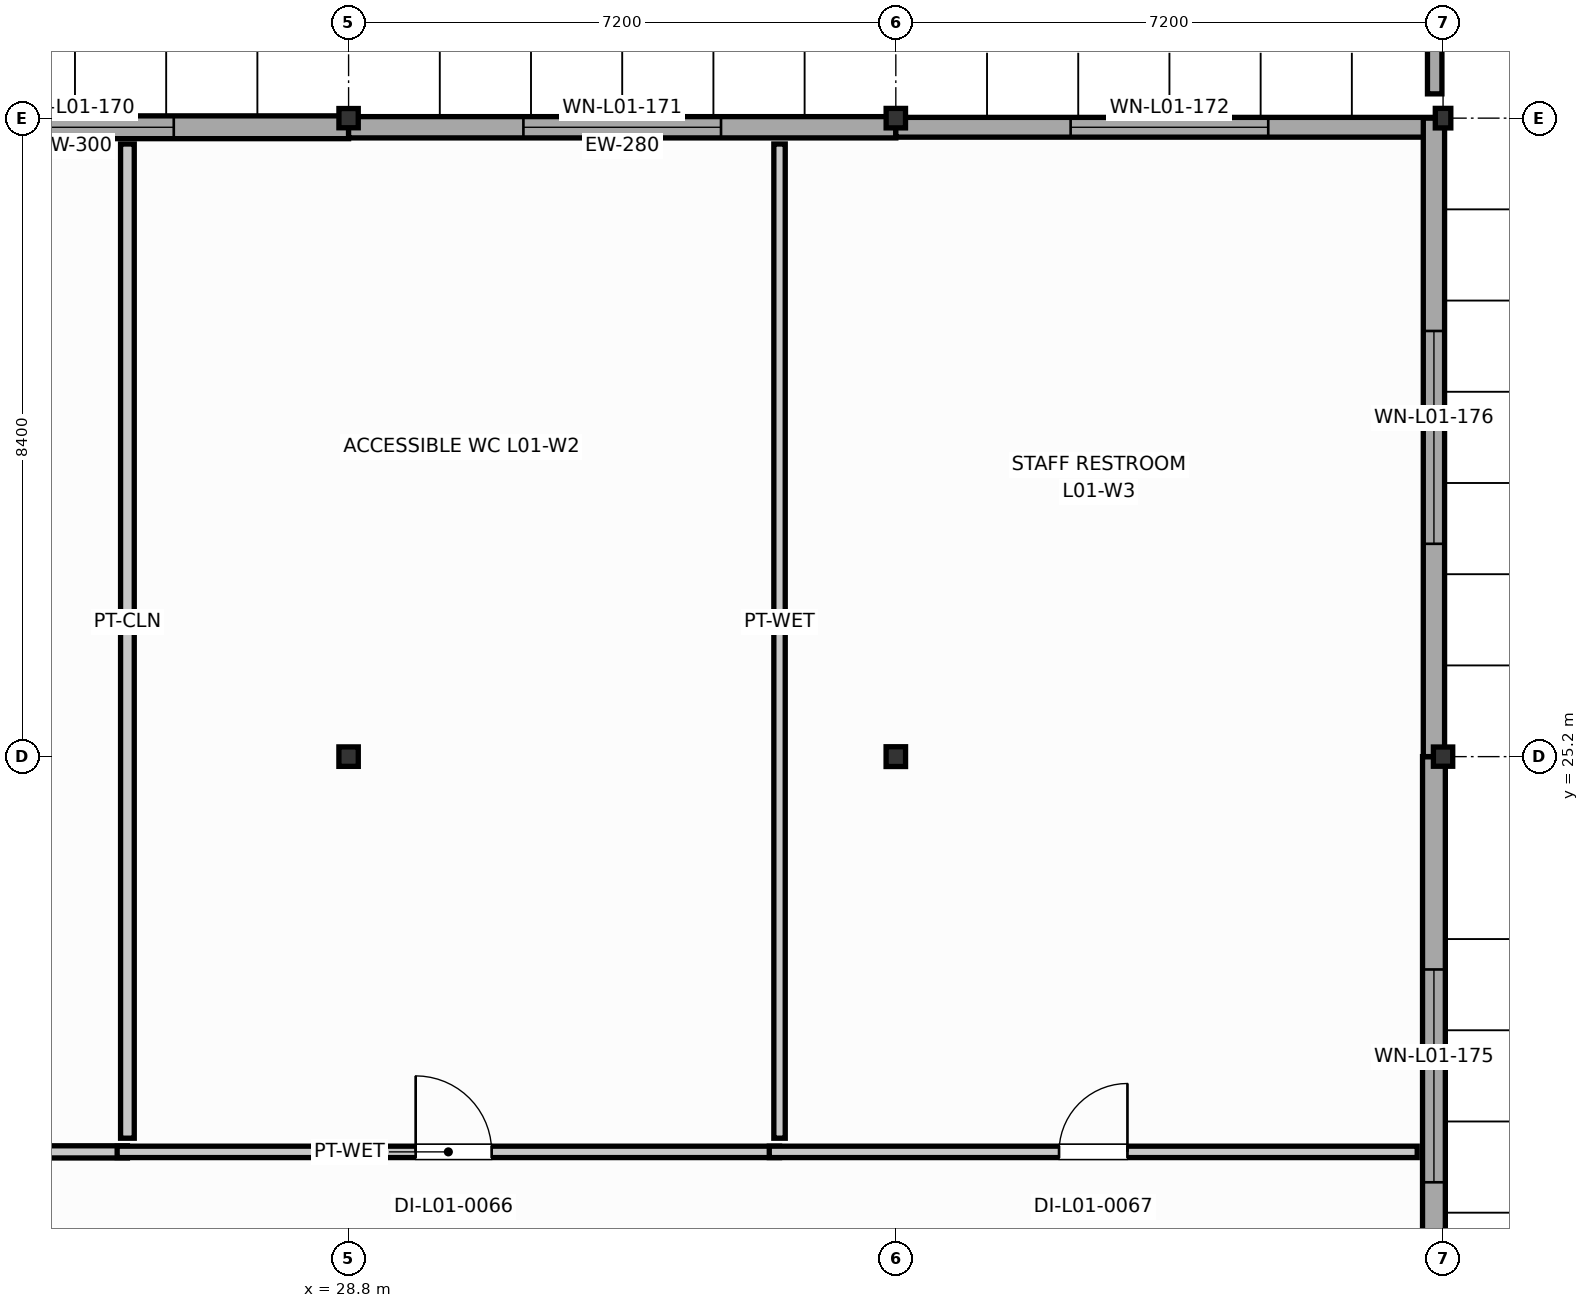
"""IFC4 building model, lengths in metres.
Left out: names, types, materials, properties, quantities, classifications, styles, units other than length and angle.
Written with IfcOpenShell. Run it as: python <this file> out.ifc"""

import sys

from ifc_helpers import new_model, si_unit, direction, frame, frame_2d, origin, origin_2d, place, context, subcontext, project, spatial, rectangle, i_section, extrude, element, fill, save


model = new_model("IFC4")
c1 = context("Model", 3, precision=1e-05, world=origin(), true_north=direction((0.0, 1.0)))
c2 = subcontext(c1, "Body", "Model", "MODEL_VIEW")
j1 = project(units=[si_unit("LENGTHUNIT", "METRE"), si_unit("PLANEANGLEUNIT", "RADIAN")], contexts=[c1])
p1 = place(None, origin())
s1 = spatial("IfcSite", under=j1, at=p1, CompositionType="ELEMENT")
p2 = place(p1, origin())
s2 = spatial("IfcBuilding", under=s1, at=p2, CompositionType="ELEMENT")
p3 = place(p2, frame((0.0, 0.0, 4.8)))
s3 = spatial("IfcBuildingStorey", under=s2, at=p3, CompositionType="ELEMENT", Elevation=4.8)
p4 = place(p3, frame((28.8, 25.2, 0.0), z_axis=(0.0, 0.0, 1.0), x_axis=(1.0, 0.0, 0.0)))
e1 = element("IfcColumn", 1, at=p4, inside=s3, PredefinedType="COLUMN", context=c2, shape_type="SweptSolid", body=[
    extrude(i_section(OverallWidth=0.255, OverallDepth=0.256, WebThickness=0.01, FlangeThickness=0.016, FilletRadius=0.013, at=origin_2d()), origin(), (0.0, 0.0, 1.0), 4.2),
])
p5 = place(p3, frame((28.8, 33.6, 0.0), z_axis=(0.0, 0.0, 1.0), x_axis=(1.0, 0.0, 0.0)))
e2 = element("IfcColumn", 2, at=p5, inside=s3, PredefinedType="COLUMN", context=c2, shape_type="SweptSolid", body=[
    extrude(i_section(OverallWidth=0.254, OverallDepth=0.253, WebThickness=0.009, FlangeThickness=0.014, FilletRadius=0.013, at=origin_2d()), origin(), (0.0, 0.0, 1.0), 4.2),
])
p6 = place(p3, frame((36.0, 25.2, 0.0), z_axis=(0.0, 0.0, 1.0), x_axis=(1.0, 0.0, 0.0)))
e3 = element("IfcColumn", 3, at=p6, inside=s3, PredefinedType="COLUMN", context=c2, shape_type="SweptSolid", body=[
    extrude(i_section(OverallWidth=0.256, OverallDepth=0.26, WebThickness=0.011, FlangeThickness=0.017, FilletRadius=0.013, at=origin_2d()), origin(), (0.0, 0.0, 1.0), 4.2),
])
p7 = place(p3, frame((36.0, 33.6, 0.0), z_axis=(0.0, 0.0, 1.0), x_axis=(1.0, 0.0, 0.0)))
e4 = element("IfcColumn", 4, at=p7, inside=s3, PredefinedType="COLUMN", context=c2, shape_type="SweptSolid", body=[
    extrude(i_section(OverallWidth=0.255, OverallDepth=0.256, WebThickness=0.01, FlangeThickness=0.016, FilletRadius=0.013, at=origin_2d()), origin(), (0.0, 0.0, 1.0), 4.2),
])
p8 = place(p3, frame((43.2, 25.2, 0.0), z_axis=(0.0, 0.0, 1.0), x_axis=(1.0, 0.0, 0.0)))
e5 = element("IfcColumn", 5, at=p8, inside=s3, PredefinedType="COLUMN", context=c2, shape_type="SweptSolid", body=[
    extrude(i_section(OverallWidth=0.254, OverallDepth=0.253, WebThickness=0.009, FlangeThickness=0.014, FilletRadius=0.013, at=origin_2d()), origin(), (0.0, 0.0, 1.0), 4.2),
])
p9 = place(p3, frame((43.2, 33.6, 0.0), z_axis=(0.0, 0.0, 1.0), x_axis=(1.0, 0.0, 0.0)))
e6 = element("IfcColumn", 6, at=p9, inside=s3, PredefinedType="COLUMN", context=c2, shape_type="SweptSolid", body=[
    extrude(i_section(OverallWidth=0.204, OverallDepth=0.257, WebThickness=0.009, FlangeThickness=0.016, FilletRadius=0.013, at=origin_2d()), origin(), (0.0, 0.0, 1.0), 4.2),
])
p10 = place(p3, frame((21.6, 33.48, 0.0), z_axis=(0.0, 0.0, 1.0), x_axis=(1.0, 0.0, 0.0)))
e7 = element("IfcWall", 7, at=p10, inside=s3, PredefinedType="SOLIDWALL", context=c2, shape_type="SweptSolid", body=[
    extrude(rectangle(XDim=7.2, YDim=0.3, at=frame_2d((3.6, 0.0))), origin(), (0.0, 0.0, 1.0), 3.245),
])
p11 = place(p10, frame((2.3, 0.0, 0.95)))
e8 = element("IfcOpeningElement", 8, at=p11, cuts=e7, PredefinedType="OPENING", context=c2, shape_type="SweptSolid", body=[
    extrude(rectangle(XDim=2.6, YDim=1.35, at=frame_2d((1.3, 0.675))), frame((0.0, 0.16, 0.0), z_axis=(0.0, -1.0, 0.0), x_axis=(1.0, 0.0, 0.0)), (0.0, 0.0, 1.0), 0.32),
])
p12 = place(p3, frame((28.8, 33.48, 0.0), z_axis=(0.0, 0.0, 1.0), x_axis=(1.0, 0.0, 0.0)))
e9 = element("IfcWall", 9, at=p12, inside=s3, PredefinedType="SOLIDWALL", context=c2, shape_type="SweptSolid", body=[
    extrude(rectangle(XDim=7.2, YDim=0.28, at=frame_2d((3.6, 0.0))), origin(), (0.0, 0.0, 1.0), 3.245),
])
p13 = place(p12, frame((2.3, 0.0, 0.95)))
e10 = element("IfcOpeningElement", 10, at=p13, cuts=e9, PredefinedType="OPENING", context=c2, shape_type="SweptSolid", body=[
    extrude(rectangle(XDim=2.6, YDim=1.55, at=frame_2d((1.3, 0.775))), frame((0.0, 0.15, 0.0), z_axis=(0.0, -1.0, 0.0), x_axis=(1.0, 0.0, 0.0)), (0.0, 0.0, 1.0), 0.3),
])
p14 = place(p3, frame((36.0, 33.48, 0.0), z_axis=(0.0, 0.0, 1.0), x_axis=(1.0, 0.0, 0.0)))
e11 = element("IfcWall", 11, at=p14, inside=s3, PredefinedType="SOLIDWALL", context=c2, shape_type="SweptSolid", body=[
    extrude(rectangle(XDim=7.2, YDim=0.26, at=frame_2d((3.6, 0.0))), origin(), (0.0, 0.0, 1.0), 3.245),
])
p15 = place(p14, frame((2.3, 0.0, 0.95)))
e12 = element("IfcOpeningElement", 12, at=p15, cuts=e11, PredefinedType="OPENING", context=c2, shape_type="SweptSolid", body=[
    extrude(rectangle(XDim=2.6, YDim=1.75, at=frame_2d((1.3, 0.875))), frame((0.0, 0.14, 0.0), z_axis=(0.0, -1.0, 0.0), x_axis=(1.0, 0.0, 0.0)), (0.0, 0.0, 1.0), 0.28),
])
p16 = place(p3, frame((43.08, 16.8, 0.0), z_axis=(0.0, 0.0, 1.0), x_axis=(0.0, 1.0, 0.0)))
e13 = element("IfcWall", 13, at=p16, inside=s3, PredefinedType="SOLIDWALL", context=c2, shape_type="SweptSolid", body=[
    extrude(rectangle(XDim=8.4, YDim=0.3, at=frame_2d((4.2, 0.0))), origin(), (0.0, 0.0, 1.0), 3.087),
])
p17 = place(p16, frame((2.8, 0.0, 0.95)))
e14 = element("IfcOpeningElement", 14, at=p17, cuts=e13, PredefinedType="OPENING", context=c2, shape_type="SweptSolid", body=[
    extrude(rectangle(XDim=2.8, YDim=1.55, at=frame_2d((1.4, 0.775))), frame((0.0, 0.16, 0.0), z_axis=(0.0, -1.0, 0.0), x_axis=(1.0, 0.0, 0.0)), (0.0, 0.0, 1.0), 0.32),
])
p18 = place(p3, frame((43.08, 25.2, 0.0), z_axis=(0.0, 0.0, 1.0), x_axis=(0.0, 1.0, 0.0)))
e15 = element("IfcWall", 15, at=p18, inside=s3, PredefinedType="SOLIDWALL", context=c2, shape_type="SweptSolid", body=[
    extrude(rectangle(XDim=8.4, YDim=0.28, at=frame_2d((4.2, 0.0))), origin(), (0.0, 0.0, 1.0), 3.168),
])
p19 = place(p18, frame((2.8, 0.0, 0.95)))
e16 = element("IfcOpeningElement", 16, at=p19, cuts=e15, PredefinedType="OPENING", context=c2, shape_type="SweptSolid", body=[
    extrude(rectangle(XDim=2.8, YDim=1.75, at=frame_2d((1.4, 0.875))), frame((0.0, 0.15, 0.0), z_axis=(0.0, -1.0, 0.0), x_axis=(1.0, 0.0, 0.0)), (0.0, 0.0, 1.0), 0.3),
])
p20 = place(p3, frame((43.09, 33.919, 0.0), z_axis=(0.0, 0.0, 1.0), x_axis=(0.0, 1.0, 0.0)))
e17 = element("IfcWall", 17, at=p20, inside=s3, PredefinedType="PARAPET", context=c2, shape_type="SweptSolid", body=[
    extrude(rectangle(XDim=7.861, YDim=0.19, at=frame_2d((3.93, 0.0))), origin(), (0.0, 0.0, 1.0), 1.15),
])
p21 = place(p3, frame((25.89, 20.0, 0.0), z_axis=(0.0, 0.0, 1.0), x_axis=(-1.0, 0.0, 0.0)))
e18 = element("IfcWall", 18, at=p21, inside=s3, PredefinedType="PARTITIONING", context=c2, shape_type="SweptSolid", body=[
    extrude(rectangle(XDim=8.4, YDim=0.16, at=frame_2d((4.2, 0.0))), origin(), (0.0, 0.0, 1.0), 3.531),
])
p22 = place(p21, frame((3.53, 0.0, 0.0)))
e19 = element("IfcOpeningElement", 19, at=p22, cuts=e18, PredefinedType="OPENING", context=c2, shape_type="SweptSolid", body=[
    extrude(rectangle(XDim=1.2, YDim=2.15, at=frame_2d((0.6, 1.075))), frame((0.0, 0.09, 0.0), z_axis=(0.0, -1.0, 0.0), x_axis=(1.0, 0.0, 0.0)), (0.0, 0.0, 1.0), 0.18),
])
p23 = place(p3, frame((25.89, 33.26, 0.0), z_axis=(0.0, 0.0, 1.0), x_axis=(0.0, -1.0, 0.0)))
e20 = element("IfcWall", 20, at=p23, inside=s3, PredefinedType="PARTITIONING", context=c2, shape_type="SweptSolid", body=[
    extrude(rectangle(XDim=13.08, YDim=0.18, at=frame_2d((6.54, 0.0))), origin(), (0.0, 0.0, 1.0), 3.324),
])
p24 = place(p3, frame((34.47, 20.0, 0.0), z_axis=(0.0, 0.0, 1.0), x_axis=(-1.0, 0.0, 0.0)))
e21 = element("IfcWall", 21, at=p24, inside=s3, PredefinedType="PLUMBINGWALL", context=c2, shape_type="SweptSolid", body=[
    extrude(rectangle(XDim=8.715, YDim=0.15, at=frame_2d((4.357, 0.0))), origin(), (0.0, 0.0, 1.0), 3.404),
])
p25 = place(p24, frame((3.788, 0.0, 0.0)))
e22 = element("IfcOpeningElement", 22, at=p25, cuts=e21, PredefinedType="OPENING", context=c2, shape_type="SweptSolid", body=[
    extrude(rectangle(XDim=1.0, YDim=2.1, at=frame_2d((0.5, 1.05))), frame((0.0, 0.085, 0.0), z_axis=(0.0, -1.0, 0.0), x_axis=(1.0, 0.0, 0.0)), (0.0, 0.0, 1.0), 0.17),
])
p26 = place(p3, frame((34.47, 33.26, 0.0), z_axis=(0.0, 0.0, 1.0), x_axis=(0.0, -1.0, 0.0)))
e23 = element("IfcWall", 23, at=p26, inside=s3, PredefinedType="PLUMBINGWALL", context=c2, shape_type="SweptSolid", body=[
    extrude(rectangle(XDim=13.08, YDim=0.15, at=frame_2d((6.54, 0.0))), origin(), (0.0, 0.0, 1.0), 3.329),
])
p27 = place(p3, frame((42.86, 20.0, 0.0), z_axis=(0.0, 0.0, 1.0), x_axis=(-1.0, 0.0, 0.0)))
e24 = element("IfcWall", 24, at=p27, inside=s3, PredefinedType="PLUMBINGWALL", context=c2, shape_type="SweptSolid", body=[
    extrude(rectangle(XDim=8.525, YDim=0.15, at=frame_2d((4.263, 0.0))), origin(), (0.0, 0.0, 1.0), 3.171),
])
p28 = place(p27, frame((3.812, 0.0, 0.0)))
e25 = element("IfcOpeningElement", 25, at=p28, cuts=e24, PredefinedType="OPENING", context=c2, shape_type="SweptSolid", body=[
    extrude(rectangle(XDim=0.9, YDim=2.1, at=frame_2d((0.45, 1.05))), frame((0.0, 0.085, 0.0), z_axis=(0.0, -1.0, 0.0), x_axis=(1.0, 0.0, 0.0)), (0.0, 0.0, 1.0), 0.17),
])
p29 = place(p11, origin())
e26 = element("IfcWindow", 26, at=p29, inside=s3, PartitioningType="SINGLE_PANEL", PredefinedType="WINDOW", context=c2, shape_type="SweptSolid", body=[
    extrude(rectangle(XDim=2.6, YDim=1.35, at=frame_2d((1.3, 0.675))), frame((0.0, 0.03, 0.0), z_axis=(0.0, -1.0, 0.0), x_axis=(1.0, 0.0, 0.0)), (0.0, 0.0, 1.0), 0.06),
])
fill(e8, e26)
p30 = place(p13, origin())
e27 = element("IfcWindow", 27, at=p30, inside=s3, PartitioningType="SINGLE_PANEL", PredefinedType="WINDOW", context=c2, shape_type="SweptSolid", body=[
    extrude(rectangle(XDim=2.6, YDim=1.55, at=frame_2d((1.3, 0.775))), frame((0.0, 0.03, 0.0), z_axis=(0.0, -1.0, 0.0), x_axis=(1.0, 0.0, 0.0)), (0.0, 0.0, 1.0), 0.06),
])
fill(e10, e27)
p31 = place(p15, origin())
e28 = element("IfcWindow", 28, at=p31, inside=s3, PartitioningType="SINGLE_PANEL", PredefinedType="WINDOW", context=c2, shape_type="SweptSolid", body=[
    extrude(rectangle(XDim=2.6, YDim=1.75, at=frame_2d((1.3, 0.875))), frame((0.0, 0.03, 0.0), z_axis=(0.0, -1.0, 0.0), x_axis=(1.0, 0.0, 0.0)), (0.0, 0.0, 1.0), 0.06),
])
fill(e12, e28)
p32 = place(p17, origin())
e29 = element("IfcWindow", 29, at=p32, inside=s3, PartitioningType="SINGLE_PANEL", PredefinedType="WINDOW", context=c2, shape_type="SweptSolid", body=[
    extrude(rectangle(XDim=2.8, YDim=1.55, at=frame_2d((1.4, 0.775))), frame((0.0, 0.03, 0.0), z_axis=(0.0, -1.0, 0.0), x_axis=(1.0, 0.0, 0.0)), (0.0, 0.0, 1.0), 0.06),
])
fill(e14, e29)
p33 = place(p19, origin())
e30 = element("IfcWindow", 30, at=p33, inside=s3, PartitioningType="SINGLE_PANEL", PredefinedType="WINDOW", context=c2, shape_type="SweptSolid", body=[
    extrude(rectangle(XDim=2.8, YDim=1.75, at=frame_2d((1.4, 0.875))), frame((0.0, 0.03, 0.0), z_axis=(0.0, -1.0, 0.0), x_axis=(1.0, 0.0, 0.0)), (0.0, 0.0, 1.0), 0.06),
])
fill(e16, e30)
p34 = place(p25, frame((1.0, 0.0, 0.0), z_axis=(0.0, 0.0, 1.0), x_axis=(-1.0, 0.0, 0.0)))
e31 = element("IfcDoor", 31, at=p34, inside=s3, OperationType="SINGLE_SWING_LEFT", PredefinedType="DOOR", context=c2, shape_type="SweptSolid", body=[
    extrude(rectangle(XDim=1.0, YDim=2.1, at=frame_2d((0.5, 1.05))), frame((0.0, 0.025, 0.0), z_axis=(0.0, -1.0, 0.0), x_axis=(1.0, 0.0, 0.0)), (0.0, 0.0, 1.0), 0.05),
])
fill(e22, e31)
p35 = place(p28, frame((0.9, 0.0, 0.0), z_axis=(0.0, 0.0, 1.0), x_axis=(-1.0, 0.0, 0.0)))
e32 = element("IfcDoor", 32, at=p35, inside=s3, OperationType="SINGLE_SWING_RIGHT", PredefinedType="DOOR", context=c2, shape_type="SweptSolid", body=[
    extrude(rectangle(XDim=0.9, YDim=2.1, at=frame_2d((0.45, 1.05))), frame((0.0, 0.025, 0.0), z_axis=(0.0, -1.0, 0.0), x_axis=(1.0, 0.0, 0.0)), (0.0, 0.0, 1.0), 0.05),
])
fill(e25, e32)
save(model, sys.argv[1])
